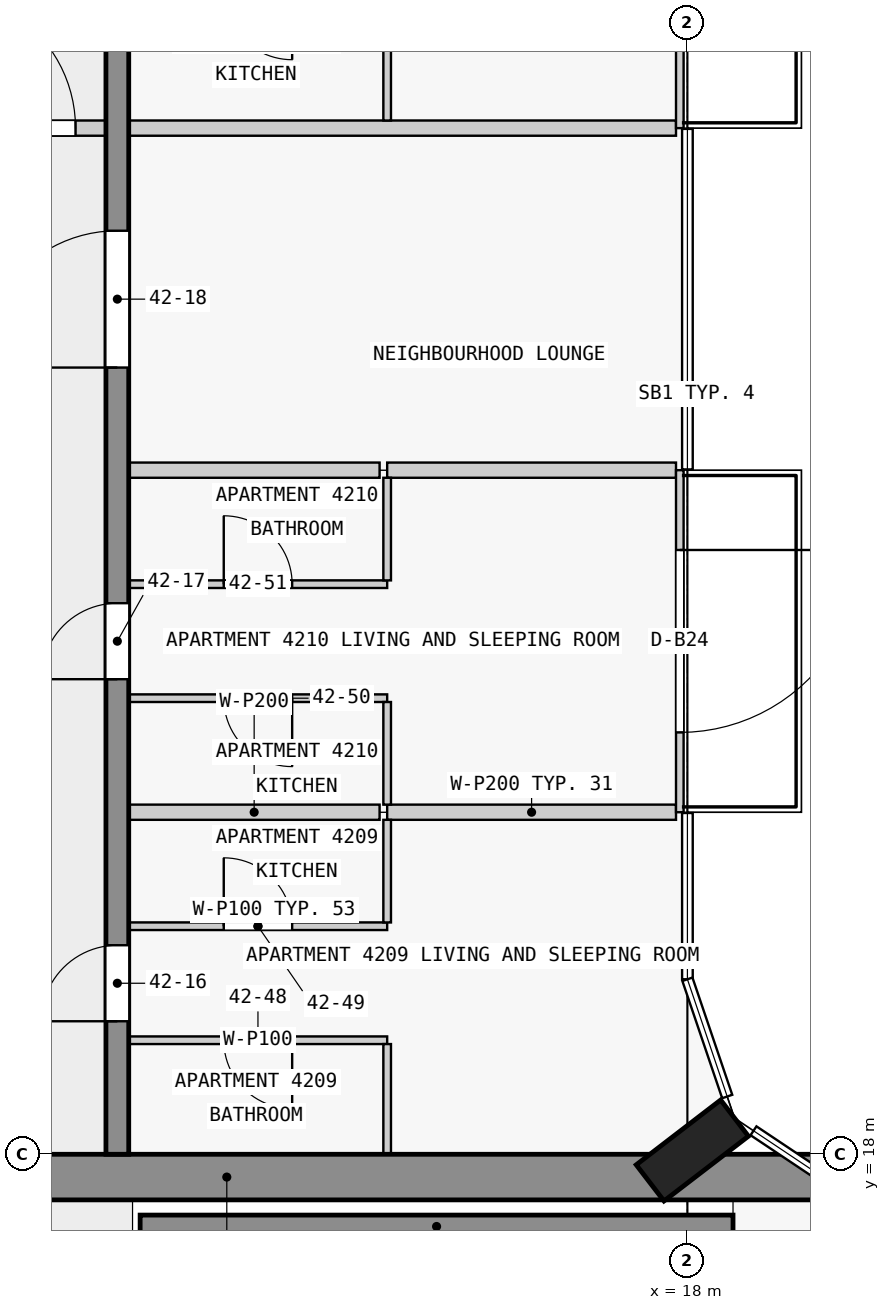
"""IFC4 building model, lengths in metres.
Left out: names, types, materials, properties, quantities, classifications, styles, units other than length and angle.
Written with IfcOpenShell. Run it as: python <this file> out.ifc"""

import sys

from ifc_helpers import new_model, si_unit, direction, frame, frame_2d, origin, origin_2d, place, context, subcontext, project, spatial, rectangle, extrude, element, fill, save


model = new_model("IFC4")
c1 = context("Model", 3, precision=1e-05, world=origin(), true_north=direction((0.0, 1.0)))
c2 = subcontext(c1, "Body", "Model", "MODEL_VIEW")
j1 = project(units=[si_unit("LENGTHUNIT", "METRE"), si_unit("PLANEANGLEUNIT", "RADIAN")], contexts=[c1])
p1 = place(None, origin())
s1 = spatial("IfcSite", under=j1, at=p1, CompositionType="ELEMENT")
p2 = place(p1, origin())
s2 = spatial("IfcBuilding", under=s1, at=p2, CompositionType="ELEMENT")
p3 = place(p2, frame((0.0, 0.0, 163.9)))
s3 = spatial("IfcBuildingStorey", under=s2, at=p3, CompositionType="ELEMENT", Elevation=163.9)
p4 = place(p3, frame((18.065, 18.05, 0.0), z_axis=(0.0, 0.0, 1.0), x_axis=(-0.608810846443, 0.793315418515, 0.0)))
e1 = element("IfcColumn", 1, at=p4, inside=s3, PredefinedType="COLUMN", context=c2, shape_type="SweptSolid", body=[
    extrude(rectangle(XDim=0.6, YDim=1.4, at=origin_2d()), origin(), (0.0, 0.0, 1.0), 3.5),
])
p5 = place(p3, frame((1.38, 17.7, 0.0), z_axis=(0.0, 0.0, 1.0), x_axis=(1.0, 0.0, 0.0)))
e2 = element("IfcWall", 2, at=p5, inside=s3, PredefinedType="SHEAR", context=c2, shape_type="SweptSolid", body=[
    extrude(rectangle(XDim=21.12, YDim=0.6, at=frame_2d((10.56, 0.0))), origin(), (0.0, 0.0, 1.0), 3.25),
])
p6 = place(p5, frame((6.4, 0.0, 0.0)))
e3 = element("IfcOpeningElement", 3, at=p6, cuts=e2, PredefinedType="OPENING", context=c2, shape_type="SweptSolid", body=[
    extrude(rectangle(XDim=1.8, YDim=2.1, at=frame_2d((0.9, 1.05))), frame((0.0, 0.31, 0.0), z_axis=(0.0, -1.0, 0.0), x_axis=(1.0, 0.0, 0.0)), (0.0, 0.0, 1.0), 0.62),
])
p7 = place(p3, frame((10.8, 17.05, 0.0), z_axis=(0.0, 0.0, 1.0), x_axis=(1.0, 0.0, 0.0)))
e4 = element("IfcWall", 4, at=p7, inside=s3, PredefinedType="SHEAR", context=c2, shape_type="SweptSolid", body=[
    extrude(rectangle(XDim=7.8, YDim=0.3, at=frame_2d((3.9, 0.0))), origin(), (0.0, 0.0, 1.0), 3.25),
])
p8 = place(p3, frame((10.5, 18.0, 0.0), z_axis=(0.0, 0.0, 1.0), x_axis=(0.0, 1.0, 0.0)))
e5 = element("IfcWall", 5, at=p8, inside=s3, PredefinedType="SHEAR", context=c2, shape_type="SweptSolid", body=[
    extrude(rectangle(XDim=27.0, YDim=0.3, at=frame_2d((13.5, 0.0))), origin(), (0.0, 0.0, 1.0), 3.25),
])
p9 = place(p8, frame((1.75, 0.0, 0.0)))
e6 = element("IfcOpeningElement", 6, at=p9, cuts=e5, PredefinedType="OPENING", context=c2, shape_type="SweptSolid", body=[
    extrude(rectangle(XDim=1.0, YDim=2.1, at=frame_2d((0.5, 1.05))), frame((0.0, 0.16, 0.0), z_axis=(0.0, -1.0, 0.0), x_axis=(1.0, 0.0, 0.0)), (0.0, 0.0, 1.0), 0.32),
])
p10 = place(p8, frame((6.25, 0.0, 0.0)))
e7 = element("IfcOpeningElement", 7, at=p10, cuts=e5, PredefinedType="OPENING", context=c2, shape_type="SweptSolid", body=[
    extrude(rectangle(XDim=1.0, YDim=2.1, at=frame_2d((0.5, 1.05))), frame((0.0, 0.16, 0.0), z_axis=(0.0, -1.0, 0.0), x_axis=(1.0, 0.0, 0.0)), (0.0, 0.0, 1.0), 0.32),
])
p11 = place(p8, frame((10.35, 0.0, 0.0)))
e8 = element("IfcOpeningElement", 8, at=p11, cuts=e5, PredefinedType="OPENING", context=c2, shape_type="SweptSolid", body=[
    extrude(rectangle(XDim=1.8, YDim=2.1, at=frame_2d((0.9, 1.05))), frame((0.0, 0.16, 0.0), z_axis=(0.0, -1.0, 0.0), x_axis=(1.0, 0.0, 0.0)), (0.0, 0.0, 1.0), 0.32),
])
p12 = place(p8, frame((17.55, 0.0, 0.0)))
e9 = element("IfcOpeningElement", 9, at=p12, cuts=e5, PredefinedType="OPENING", context=c2, shape_type="SweptSolid", body=[
    extrude(rectangle(XDim=1.0, YDim=2.1, at=frame_2d((0.5, 1.05))), frame((0.0, 0.16, 0.0), z_axis=(0.0, -1.0, 0.0), x_axis=(1.0, 0.0, 0.0)), (0.0, 0.0, 1.0), 0.32),
])
p13 = place(p8, frame((23.25, 0.0, 0.0)))
e10 = element("IfcOpeningElement", 10, at=p13, cuts=e5, PredefinedType="OPENING", context=c2, shape_type="SweptSolid", body=[
    extrude(rectangle(XDim=0.9, YDim=2.1, at=frame_2d((0.45, 1.05))), frame((0.0, 0.16, 0.0), z_axis=(0.0, -1.0, 0.0), x_axis=(1.0, 0.0, 0.0)), (0.0, 0.0, 1.0), 0.32),
])
p14 = place(p8, frame((25.45, 0.0, 0.0)))
e11 = element("IfcOpeningElement", 11, at=p14, cuts=e5, PredefinedType="OPENING", context=c2, shape_type="SweptSolid", body=[
    extrude(rectangle(XDim=1.0, YDim=2.1, at=frame_2d((0.5, 1.05))), frame((0.0, 0.16, 0.0), z_axis=(0.0, -1.0, 0.0), x_axis=(1.0, 0.0, 0.0)), (0.0, 0.0, 1.0), 0.32),
])
p15 = place(p3, frame((17.9, 27.0, 0.0), z_axis=(0.0, 0.0, 1.0), x_axis=(0.0, -1.0, 0.0)))
e12 = element("IfcWall", 12, at=p15, inside=s3, PredefinedType="STANDARD", context=c2, shape_type="SweptSolid", body=[
    extrude(rectangle(XDim=4.5, YDim=0.1, at=frame_2d((2.25, 0.0))), origin(), (0.0, 0.0, 1.0), 3.25),
])
p16 = place(p15, frame((1.05, 0.0, 0.0)))
e13 = element("IfcOpeningElement", 13, at=p16, cuts=e12, PredefinedType="OPENING", context=c2, shape_type="SweptSolid", body=[
    extrude(rectangle(XDim=2.4, YDim=2.4, at=frame_2d((1.2, 1.2))), frame((0.0, 0.06, 0.0), z_axis=(0.0, -1.0, 0.0), x_axis=(1.0, 0.0, 0.0)), (0.0, 0.0, 1.0), 0.12),
])
p17 = place(p3, frame((17.9, 36.0, 0.0), z_axis=(0.0, 0.0, 1.0), x_axis=(0.0, -1.0, 0.0)))
e14 = element("IfcWall", 14, at=p17, inside=s3, PredefinedType="STANDARD", context=c2, shape_type="SweptSolid", body=[
    extrude(rectangle(XDim=4.5, YDim=0.1, at=frame_2d((2.25, 0.0))), origin(), (0.0, 0.0, 1.0), 3.25),
])
p18 = place(p17, frame((1.05, 0.0, 0.0)))
e15 = element("IfcOpeningElement", 15, at=p18, cuts=e14, PredefinedType="OPENING", context=c2, shape_type="SweptSolid", body=[
    extrude(rectangle(XDim=2.4, YDim=2.4, at=frame_2d((1.2, 1.2))), frame((0.0, 0.06, 0.0), z_axis=(0.0, -1.0, 0.0), x_axis=(1.0, 0.0, 0.0)), (0.0, 0.0, 1.0), 0.12),
])
p19 = place(p3, frame((14.05, 19.5, 0.0), z_axis=(0.0, 0.0, 1.0), x_axis=(-1.0, 0.0, 0.0)))
e16 = element("IfcWall", 16, at=p19, inside=s3, PredefinedType="PARTITIONING", context=c2, shape_type="SweptSolid", body=[
    extrude(rectangle(XDim=3.4, YDim=0.1, at=frame_2d((1.7, 0.0))), origin(), (0.0, 0.0, 1.0), 3.25),
])
p20 = place(p19, frame((1.25, 0.0, 0.0)))
e17 = element("IfcOpeningElement", 17, at=p20, cuts=e16, PredefinedType="OPENING", context=c2, shape_type="SweptSolid", body=[
    extrude(rectangle(XDim=0.9, YDim=2.1, at=frame_2d((0.45, 1.05))), frame((0.0, 0.06, 0.0), z_axis=(0.0, -1.0, 0.0), x_axis=(1.0, 0.0, 0.0)), (0.0, 0.0, 1.0), 0.12),
])
p21 = place(p3, frame((10.65, 21.0, 0.0), z_axis=(0.0, 0.0, 1.0), x_axis=(1.0, 0.0, 0.0)))
e18 = element("IfcWall", 18, at=p21, inside=s3, PredefinedType="PARTITIONING", context=c2, shape_type="SweptSolid", body=[
    extrude(rectangle(XDim=3.4, YDim=0.1, at=frame_2d((1.7, 0.0))), origin(), (0.0, 0.0, 1.0), 3.25),
])
p22 = place(p21, frame((1.25, 0.0, 0.0)))
e19 = element("IfcOpeningElement", 19, at=p22, cuts=e18, PredefinedType="OPENING", context=c2, shape_type="SweptSolid", body=[
    extrude(rectangle(XDim=0.9, YDim=2.1, at=frame_2d((0.45, 1.05))), frame((0.0, 0.06, 0.0), z_axis=(0.0, -1.0, 0.0), x_axis=(1.0, 0.0, 0.0)), (0.0, 0.0, 1.0), 0.12),
])
p23 = place(p3, frame((13.95, 22.5, 0.0), z_axis=(0.0, 0.0, 1.0), x_axis=(-1.0, 0.0, 0.0)))
e20 = element("IfcWall", 20, at=p23, inside=s3, PredefinedType="PARTITIONING", context=c2, shape_type="SweptSolid", body=[
    extrude(rectangle(XDim=3.3, YDim=0.2, at=frame_2d((1.65, 0.0))), origin(), (0.0, 0.0, 1.0), 3.25),
])
p24 = place(p3, frame((14.05, 22.5, 0.0), z_axis=(0.0, 0.0, 1.0), x_axis=(1.0, 0.0, 0.0)))
e21 = element("IfcWall", 21, at=p24, inside=s3, PredefinedType="PARTITIONING", context=c2, shape_type="SweptSolid", body=[
    extrude(rectangle(XDim=3.8, YDim=0.2, at=frame_2d((1.9, 0.0))), origin(), (0.0, 0.0, 1.0), 3.25),
])
p25 = place(p3, frame((14.05, 24.0, 0.0), z_axis=(0.0, 0.0, 1.0), x_axis=(-1.0, 0.0, 0.0)))
e22 = element("IfcWall", 22, at=p25, inside=s3, PredefinedType="PARTITIONING", context=c2, shape_type="SweptSolid", body=[
    extrude(rectangle(XDim=3.4, YDim=0.1, at=frame_2d((1.7, 0.0))), origin(), (0.0, 0.0, 1.0), 3.25),
])
p26 = place(p25, frame((1.25, 0.0, 0.0)))
e23 = element("IfcOpeningElement", 23, at=p26, cuts=e22, PredefinedType="OPENING", context=c2, shape_type="SweptSolid", body=[
    extrude(rectangle(XDim=0.9, YDim=2.1, at=frame_2d((0.45, 1.05))), frame((0.0, 0.06, 0.0), z_axis=(0.0, -1.0, 0.0), x_axis=(1.0, 0.0, 0.0)), (0.0, 0.0, 1.0), 0.12),
])
p27 = place(p3, frame((10.65, 25.5, 0.0), z_axis=(0.0, 0.0, 1.0), x_axis=(1.0, 0.0, 0.0)))
e24 = element("IfcWall", 24, at=p27, inside=s3, PredefinedType="PARTITIONING", context=c2, shape_type="SweptSolid", body=[
    extrude(rectangle(XDim=3.4, YDim=0.1, at=frame_2d((1.7, 0.0))), origin(), (0.0, 0.0, 1.0), 3.25),
])
p28 = place(p27, frame((1.25, 0.0, 0.0)))
e25 = element("IfcOpeningElement", 25, at=p28, cuts=e24, PredefinedType="OPENING", context=c2, shape_type="SweptSolid", body=[
    extrude(rectangle(XDim=0.9, YDim=2.1, at=frame_2d((0.45, 1.05))), frame((0.0, 0.06, 0.0), z_axis=(0.0, -1.0, 0.0), x_axis=(1.0, 0.0, 0.0)), (0.0, 0.0, 1.0), 0.12),
])
p29 = place(p3, frame((13.95, 27.0, 0.0), z_axis=(0.0, 0.0, 1.0), x_axis=(-1.0, 0.0, 0.0)))
e26 = element("IfcWall", 26, at=p29, inside=s3, PredefinedType="PARTITIONING", context=c2, shape_type="SweptSolid", body=[
    extrude(rectangle(XDim=3.3, YDim=0.2, at=frame_2d((1.65, 0.0))), origin(), (0.0, 0.0, 1.0), 3.25),
])
p30 = place(p3, frame((14.05, 27.0, 0.0), z_axis=(0.0, 0.0, 1.0), x_axis=(1.0, 0.0, 0.0)))
e27 = element("IfcWall", 27, at=p30, inside=s3, PredefinedType="PARTITIONING", context=c2, shape_type="SweptSolid", body=[
    extrude(rectangle(XDim=3.8, YDim=0.2, at=frame_2d((1.9, 0.0))), origin(), (0.0, 0.0, 1.0), 3.25),
])
p31 = place(p3, frame((17.85, 31.5, 0.0), z_axis=(0.0, 0.0, 1.0), x_axis=(-1.0, 0.0, 0.0)))
e28 = element("IfcWall", 28, at=p31, inside=s3, PredefinedType="PARTITIONING", context=c2, shape_type="SweptSolid", body=[
    extrude(rectangle(XDim=7.2, YDim=0.2, at=frame_2d((3.6, 0.0))), origin(), (0.0, 0.0, 1.0), 3.25),
])
p32 = place(p3, frame((14.05, 18.0, 0.0), z_axis=(0.0, 0.0, 1.0), x_axis=(0.0, 1.0, 0.0)))
e29 = element("IfcWall", 29, at=p32, inside=s3, PredefinedType="PARTITIONING", context=c2, shape_type="SweptSolid", body=[
    extrude(rectangle(XDim=1.45, YDim=0.1, at=frame_2d((0.725, 0.0))), origin(), (0.0, 0.0, 1.0), 3.25),
])
for number, where, z_axis, x_axis in (
    (30, (14.05, 21.05, 0.0), (0.0, 0.0, 1.0), (0.0, 1.0, 0.0)),
    (31, (14.05, 22.6, 0.0), (0.0, 0.0, 1.0), (0.0, 1.0, 0.0)),
    (32, (14.05, 25.55, 0.0), (0.0, 0.0, 1.0), (0.0, 1.0, 0.0)),
):
    element("IfcWall", number, at=place(p3, frame(where, z_axis=z_axis, x_axis=x_axis)), inside=s3, PredefinedType="PARTITIONING", context=c2, shape_type="SweptSolid", body=[
        extrude(rectangle(XDim=1.35, YDim=0.1, at=frame_2d((0.675, 0.0))), origin(), (0.0, 0.0, 1.0), 3.25),
    ])
p33 = place(p3, frame((14.05, 31.6, 0.0), z_axis=(0.0, 0.0, 1.0), x_axis=(0.0, 1.0, 0.0)))
e33 = element("IfcWall", 33, at=p33, inside=s3, PredefinedType="PARTITIONING", context=c2, shape_type="SweptSolid", body=[
    extrude(rectangle(XDim=1.65, YDim=0.1, at=frame_2d((0.825, 0.0))), origin(), (0.0, 0.0, 1.0), 3.25),
])
p34 = place(p3, frame((7.45, 31.5, 0.0), z_axis=(0.0, 0.0, 1.0), x_axis=(1.0, 0.0, 0.0)))
e34 = element("IfcWall", 34, at=p34, inside=s3, PredefinedType="PARTITIONING", context=c2, shape_type="SweptSolid", body=[
    extrude(rectangle(XDim=3.1, YDim=0.2, at=frame_2d((1.55, 0.0))), origin(), (0.0, 0.0, 1.0), 3.25),
])
p35 = place(p34, frame((0.7, 0.0, 0.0)))
e35 = element("IfcOpeningElement", 35, at=p35, cuts=e34, PredefinedType="OPENING", context=c2, shape_type="SweptSolid", body=[
    extrude(rectangle(XDim=1.8, YDim=2.1, at=frame_2d((0.9, 1.05))), frame((0.0, 0.11, 0.0), z_axis=(0.0, -1.0, 0.0), x_axis=(1.0, 0.0, 0.0)), (0.0, 0.0, 1.0), 0.22),
])
p36 = place(p16, origin())
e36 = element("IfcDoor", 36, at=p36, inside=s3, OperationType="SINGLE_SWING_LEFT", PredefinedType="DOOR", context=c2, shape_type="SweptSolid", body=[
    extrude(rectangle(XDim=2.4, YDim=2.4, at=frame_2d((1.2, 1.2))), frame((0.0, 0.025, 0.0), z_axis=(0.0, -1.0, 0.0), x_axis=(1.0, 0.0, 0.0)), (0.0, 0.0, 1.0), 0.05),
])
fill(e13, e36)
p37 = place(p9, origin())
e37 = element("IfcDoor", 37, at=p37, inside=s3, OperationType="SINGLE_SWING_LEFT", PredefinedType="DOOR", context=c2, shape_type="SweptSolid", body=[
    extrude(rectangle(XDim=1.0, YDim=2.1, at=frame_2d((0.5, 1.05))), frame((0.0, 0.025, 0.0), z_axis=(0.0, -1.0, 0.0), x_axis=(1.0, 0.0, 0.0)), (0.0, 0.0, 1.0), 0.05),
])
fill(e6, e37)
p38 = place(p10, origin())
e38 = element("IfcDoor", 38, at=p38, inside=s3, OperationType="SINGLE_SWING_LEFT", PredefinedType="DOOR", context=c2, shape_type="SweptSolid", body=[
    extrude(rectangle(XDim=1.0, YDim=2.1, at=frame_2d((0.5, 1.05))), frame((0.0, 0.025, 0.0), z_axis=(0.0, -1.0, 0.0), x_axis=(1.0, 0.0, 0.0)), (0.0, 0.0, 1.0), 0.05),
])
fill(e7, e38)
p39 = place(p11, origin())
e39 = element("IfcDoor", 39, at=p39, inside=s3, OperationType="SINGLE_SWING_LEFT", PredefinedType="DOOR", context=c2, shape_type="SweptSolid", body=[
    extrude(rectangle(XDim=1.8, YDim=2.1, at=frame_2d((0.9, 1.05))), frame((0.0, 0.025, 0.0), z_axis=(0.0, -1.0, 0.0), x_axis=(1.0, 0.0, 0.0)), (0.0, 0.0, 1.0), 0.05),
])
fill(e8, e39)
p40 = place(p35, origin())
e40 = element("IfcDoor", 40, at=p40, inside=s3, OperationType="SINGLE_SWING_RIGHT", PredefinedType="DOOR", context=c2, shape_type="SweptSolid", body=[
    extrude(rectangle(XDim=1.8, YDim=2.1, at=frame_2d((0.9, 1.05))), frame((0.0, 0.025, 0.0), z_axis=(0.0, -1.0, 0.0), x_axis=(1.0, 0.0, 0.0)), (0.0, 0.0, 1.0), 0.05),
])
fill(e35, e40)
p41 = place(p20, origin())
e41 = element("IfcDoor", 41, at=p41, inside=s3, OperationType="SINGLE_SWING_LEFT", PredefinedType="DOOR", context=c2, shape_type="SweptSolid", body=[
    extrude(rectangle(XDim=0.9, YDim=2.1, at=frame_2d((0.45, 1.05))), frame((0.0, 0.025, 0.0), z_axis=(0.0, -1.0, 0.0), x_axis=(1.0, 0.0, 0.0)), (0.0, 0.0, 1.0), 0.05),
])
fill(e17, e41)
p42 = place(p22, origin())
e42 = element("IfcDoor", 42, at=p42, inside=s3, OperationType="SINGLE_SWING_LEFT", PredefinedType="DOOR", context=c2, shape_type="SweptSolid", body=[
    extrude(rectangle(XDim=0.9, YDim=2.1, at=frame_2d((0.45, 1.05))), frame((0.0, 0.025, 0.0), z_axis=(0.0, -1.0, 0.0), x_axis=(1.0, 0.0, 0.0)), (0.0, 0.0, 1.0), 0.05),
])
fill(e19, e42)
p43 = place(p26, origin())
e43 = element("IfcDoor", 43, at=p43, inside=s3, OperationType="SINGLE_SWING_LEFT", PredefinedType="DOOR", context=c2, shape_type="SweptSolid", body=[
    extrude(rectangle(XDim=0.9, YDim=2.1, at=frame_2d((0.45, 1.05))), frame((0.0, 0.025, 0.0), z_axis=(0.0, -1.0, 0.0), x_axis=(1.0, 0.0, 0.0)), (0.0, 0.0, 1.0), 0.05),
])
fill(e23, e43)
p44 = place(p28, origin())
e44 = element("IfcDoor", 44, at=p44, inside=s3, OperationType="SINGLE_SWING_LEFT", PredefinedType="DOOR", context=c2, shape_type="SweptSolid", body=[
    extrude(rectangle(XDim=0.9, YDim=2.1, at=frame_2d((0.45, 1.05))), frame((0.0, 0.025, 0.0), z_axis=(0.0, -1.0, 0.0), x_axis=(1.0, 0.0, 0.0)), (0.0, 0.0, 1.0), 0.05),
])
fill(e25, e44)
save(model, sys.argv[1])
